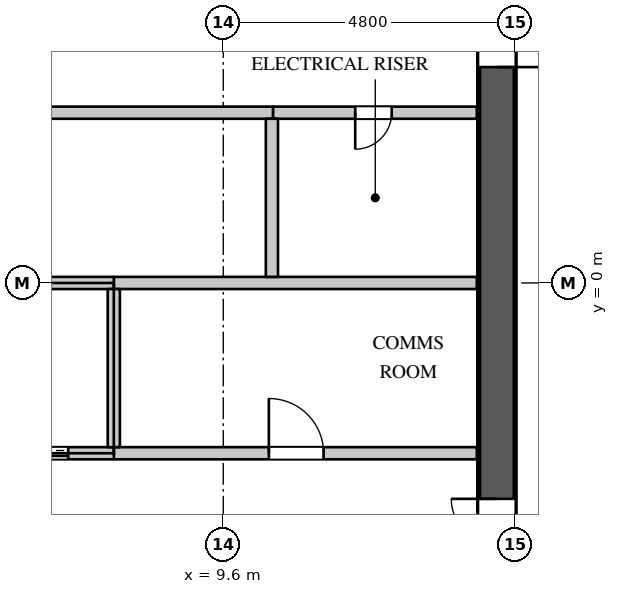
"""IFC4 building model, lengths in metres.
Left out: names, types, materials, properties, quantities, classifications, styles, units other than length and angle.
Written with IfcOpenShell. Run it as: python <this file> out.ifc"""

import sys

from ifc_helpers import new_model, si_unit, direction, frame, frame_2d, origin, place, context, subcontext, project, spatial, rectangle, extrude, element, fill, save


model = new_model("IFC4")
c1 = context("Model", 3, precision=1e-05, world=origin(), true_north=direction((0.0, 1.0)))
c2 = subcontext(c1, "Body", "Model", "MODEL_VIEW")
j1 = project(units=[si_unit("LENGTHUNIT", "METRE"), si_unit("PLANEANGLEUNIT", "RADIAN")], contexts=[c1])
p1 = place(None, origin())
s1 = spatial("IfcSite", under=j1, at=p1, CompositionType="ELEMENT")
p2 = place(p1, origin())
s2 = spatial("IfcBuilding", under=s1, at=p2, CompositionType="ELEMENT")
p3 = place(p2, frame((0.0, 0.0, 281.1)))
s3 = spatial("IfcBuildingStorey", under=s2, at=p3, CompositionType="ELEMENT", Elevation=281.1)
p4 = place(p3, frame((14.1, -11.4, 0.0), z_axis=(0.0, 0.0, 1.0), x_axis=(0.0, 1.0, 0.0)))
e1 = element("IfcWall", 1, at=p4, inside=s3, PredefinedType="SHEAR", context=c2, shape_type="SweptSolid", body=[
    extrude(rectangle(XDim=22.8, YDim=0.6, at=frame_2d((11.4, 0.0))), origin(), (0.0, 0.0, 1.0), 4.2),
])
p5 = place(p4, frame((20.45, 0.0, 0.0)))
e2 = element("IfcOpeningElement", 2, at=p5, cuts=e1, PredefinedType="OPENING", context=c2, shape_type="SweptSolid", body=[
    extrude(rectangle(XDim=1.1, YDim=2.2, at=frame_2d((0.55, 1.1))), frame((0.0, 0.31, 0.0), z_axis=(0.0, -1.0, 0.0), x_axis=(1.0, 0.0, 0.0)), (0.0, 0.0, 1.0), 0.62),
])
p6 = place(p4, frame((1.25, 0.0, 0.0)))
e3 = element("IfcOpeningElement", 3, at=p6, cuts=e1, PredefinedType="OPENING", context=c2, shape_type="SweptSolid", body=[
    extrude(rectangle(XDim=1.1, YDim=2.2, at=frame_2d((0.55, 1.1))), frame((0.0, 0.31, 0.0), z_axis=(0.0, -1.0, 0.0), x_axis=(1.0, 0.0, 0.0)), (0.0, 0.0, 1.0), 0.62),
])
p7 = place(p4, frame((14.95, 0.0, 0.0)))
e4 = element("IfcOpeningElement", 4, at=p7, cuts=e1, PredefinedType="OPENING", context=c2, shape_type="SweptSolid", body=[
    extrude(rectangle(XDim=1.5, YDim=2.4, at=frame_2d((0.75, 1.2))), frame((0.0, 0.31, 0.0), z_axis=(0.0, -1.0, 0.0), x_axis=(1.0, 0.0, 0.0)), (0.0, 0.0, 1.0), 0.62),
])
p8 = place(p4, frame((6.35, 0.0, 0.0)))
e5 = element("IfcOpeningElement", 5, at=p8, cuts=e1, PredefinedType="OPENING", context=c2, shape_type="SweptSolid", body=[
    extrude(rectangle(XDim=1.5, YDim=2.4, at=frame_2d((0.75, 1.2))), frame((0.0, 0.31, 0.0), z_axis=(0.0, -1.0, 0.0), x_axis=(1.0, 0.0, 0.0)), (0.0, 0.0, 1.0), 0.62),
])
p9 = place(p3, frame((-7.82, 2.8, 0.0), z_axis=(0.0, 0.0, 1.0), x_axis=(1.0, 0.0, 0.0)))
e6 = element("IfcWall", 6, at=p9, inside=s3, PredefinedType="PARTITIONING", context=c2, shape_type="SweptSolid", body=[
    extrude(rectangle(XDim=18.24, YDim=0.2, at=frame_2d((9.12, 0.0))), origin(), (0.0, 0.0, 1.0), 3.95),
])
p10 = place(p9, frame((3.75, 0.0, 0.0)))
e7 = element("IfcOpeningElement", 7, at=p10, cuts=e6, PredefinedType="OPENING", context=c2, shape_type="SweptSolid", body=[
    extrude(rectangle(XDim=0.9, YDim=2.2, at=frame_2d((0.45, 1.1))), frame((0.0, 0.11, 0.0), z_axis=(0.0, -1.0, 0.0), x_axis=(1.0, 0.0, 0.0)), (0.0, 0.0, 1.0), 0.22),
])
p11 = place(p9, frame((12.7, 0.0, 0.0)))
e8 = element("IfcOpeningElement", 8, at=p11, cuts=e6, PredefinedType="OPENING", context=c2, shape_type="SweptSolid", body=[
    extrude(rectangle(XDim=0.9, YDim=2.2, at=frame_2d((0.45, 1.1))), frame((0.0, 0.11, 0.0), z_axis=(0.0, -1.0, 0.0), x_axis=(1.0, 0.0, 0.0)), (0.0, 0.0, 1.0), 0.22),
])
p12 = place(p3, frame((7.8, -2.8, 0.0), z_axis=(0.0, 0.0, 1.0), x_axis=(1.0, 0.0, 0.0)))
e9 = element("IfcWall", 9, at=p12, inside=s3, PredefinedType="PARTITIONING", context=c2, shape_type="SweptSolid", body=[
    extrude(rectangle(XDim=5.97, YDim=0.2, at=frame_2d((2.985, 0.0))), origin(), (0.0, 0.0, 1.0), 3.95),
])
p13 = place(p12, frame((2.55, 0.0, 0.0)))
e10 = element("IfcOpeningElement", 10, at=p13, cuts=e9, PredefinedType="OPENING", context=c2, shape_type="SweptSolid", body=[
    extrude(rectangle(XDim=0.9, YDim=2.2, at=frame_2d((0.45, 1.1))), frame((0.0, 0.11, 0.0), z_axis=(0.0, -1.0, 0.0), x_axis=(1.0, 0.0, 0.0)), (0.0, 0.0, 1.0), 0.22),
])
p14 = place(p3, frame((7.8, 0.0, 0.0), z_axis=(0.0, 0.0, 1.0), x_axis=(1.0, 0.0, 0.0)))
e11 = element("IfcWall", 11, at=p14, inside=s3, PredefinedType="PARTITIONING", context=c2, shape_type="SweptSolid", body=[
    extrude(rectangle(XDim=5.97, YDim=0.2, at=frame_2d((2.985, 0.0))), origin(), (0.0, 0.0, 1.0), 3.95),
])
p15 = place(p3, frame((10.42, 2.8, 0.0), z_axis=(0.0, 0.0, 1.0), x_axis=(1.0, 0.0, 0.0)))
e12 = element("IfcWall", 12, at=p15, inside=s3, PredefinedType="PARTITIONING", context=c2, shape_type="SweptSolid", body=[
    extrude(rectangle(XDim=3.35, YDim=0.2, at=frame_2d((1.675, 0.0))), origin(), (0.0, 0.0, 1.0), 3.95),
])
p16 = place(p15, frame((1.35, 0.0, 0.0)))
e13 = element("IfcOpeningElement", 13, at=p16, cuts=e12, PredefinedType="OPENING", context=c2, shape_type="SweptSolid", body=[
    extrude(rectangle(XDim=0.6, YDim=2.0, at=frame_2d((0.3, 1.0))), frame((0.0, 0.11, 0.0), z_axis=(0.0, -1.0, 0.0), x_axis=(1.0, 0.0, 0.0)), (0.0, 0.0, 1.0), 0.22),
])
p17 = place(p3, frame((10.4, 0.1, 0.0), z_axis=(0.0, 0.0, 1.0), x_axis=(0.0, 1.0, 0.0)))
e14 = element("IfcWall", 14, at=p17, inside=s3, PredefinedType="PARTITIONING", context=c2, shape_type="SweptSolid", body=[
    extrude(rectangle(XDim=2.6, YDim=0.2, at=frame_2d((1.3, 0.0))), origin(), (0.0, 0.0, 1.0), 3.95),
])
p18 = place(p3, frame((-13.77, 0.0, 0.0), z_axis=(0.0, 0.0, 1.0), x_axis=(1.0, 0.0, 0.0)))
e15 = element("IfcWall", 15, at=p18, inside=s3, PredefinedType="PARTITIONING", context=c2, shape_type="SweptSolid", body=[
    extrude(rectangle(XDim=21.57, YDim=0.2, at=frame_2d((10.785, 0.0))), origin(), (0.0, 0.0, 1.0), 3.95),
])
p19 = place(p3, frame((-10.4, -2.8, 0.0), z_axis=(0.0, 0.0, 1.0), x_axis=(1.0, 0.0, 0.0)))
e16 = element("IfcWall", 16, at=p19, inside=s3, PredefinedType="PARTITIONING", context=c2, shape_type="SweptSolid", body=[
    extrude(rectangle(XDim=18.2, YDim=0.2, at=frame_2d((9.1, 0.0))), origin(), (0.0, 0.0, 1.0), 3.95),
])
p20 = place(p19, frame((0.75, 0.0, 0.0)))
e17 = element("IfcOpeningElement", 17, at=p20, cuts=e16, PredefinedType="OPENING", context=c2, shape_type="SweptSolid", body=[
    extrude(rectangle(XDim=1.1, YDim=2.2, at=frame_2d((0.55, 1.1))), frame((0.0, 0.11, 0.0), z_axis=(0.0, -1.0, 0.0), x_axis=(1.0, 0.0, 0.0)), (0.0, 0.0, 1.0), 0.22),
])
p21 = place(p19, frame((3.35, 0.0, 0.0)))
e18 = element("IfcOpeningElement", 18, at=p21, cuts=e16, PredefinedType="OPENING", context=c2, shape_type="SweptSolid", body=[
    extrude(rectangle(XDim=1.1, YDim=2.2, at=frame_2d((0.55, 1.1))), frame((0.0, 0.11, 0.0), z_axis=(0.0, -1.0, 0.0), x_axis=(1.0, 0.0, 0.0)), (0.0, 0.0, 1.0), 0.22),
])
p22 = place(p19, frame((5.95, 0.0, 0.0)))
e19 = element("IfcOpeningElement", 19, at=p22, cuts=e16, PredefinedType="OPENING", context=c2, shape_type="SweptSolid", body=[
    extrude(rectangle(XDim=1.1, YDim=2.2, at=frame_2d((0.55, 1.1))), frame((0.0, 0.11, 0.0), z_axis=(0.0, -1.0, 0.0), x_axis=(1.0, 0.0, 0.0)), (0.0, 0.0, 1.0), 0.22),
])
p23 = place(p19, frame((8.55, 0.0, 0.0)))
e20 = element("IfcOpeningElement", 20, at=p23, cuts=e16, PredefinedType="OPENING", context=c2, shape_type="SweptSolid", body=[
    extrude(rectangle(XDim=1.1, YDim=2.2, at=frame_2d((0.55, 1.1))), frame((0.0, 0.11, 0.0), z_axis=(0.0, -1.0, 0.0), x_axis=(1.0, 0.0, 0.0)), (0.0, 0.0, 1.0), 0.22),
])
p24 = place(p19, frame((11.15, 0.0, 0.0)))
e21 = element("IfcOpeningElement", 21, at=p24, cuts=e16, PredefinedType="OPENING", context=c2, shape_type="SweptSolid", body=[
    extrude(rectangle(XDim=1.1, YDim=2.2, at=frame_2d((0.55, 1.1))), frame((0.0, 0.11, 0.0), z_axis=(0.0, -1.0, 0.0), x_axis=(1.0, 0.0, 0.0)), (0.0, 0.0, 1.0), 0.22),
])
p25 = place(p19, frame((13.75, 0.0, 0.0)))
e22 = element("IfcOpeningElement", 22, at=p25, cuts=e16, PredefinedType="OPENING", context=c2, shape_type="SweptSolid", body=[
    extrude(rectangle(XDim=1.1, YDim=2.2, at=frame_2d((0.55, 1.1))), frame((0.0, 0.11, 0.0), z_axis=(0.0, -1.0, 0.0), x_axis=(1.0, 0.0, 0.0)), (0.0, 0.0, 1.0), 0.22),
])
p26 = place(p19, frame((16.35, 0.0, 0.0)))
e23 = element("IfcOpeningElement", 23, at=p26, cuts=e16, PredefinedType="OPENING", context=c2, shape_type="SweptSolid", body=[
    extrude(rectangle(XDim=1.1, YDim=2.2, at=frame_2d((0.55, 1.1))), frame((0.0, 0.11, 0.0), z_axis=(0.0, -1.0, 0.0), x_axis=(1.0, 0.0, 0.0)), (0.0, 0.0, 1.0), 0.22),
])
p27 = place(p3, frame((7.8, -2.7, 0.0), z_axis=(0.0, 0.0, 1.0), x_axis=(0.0, 1.0, 0.0)))
e24 = element("IfcWall", 24, at=p27, inside=s3, PredefinedType="PARTITIONING", context=c2, shape_type="SweptSolid", body=[
    extrude(rectangle(XDim=2.6, YDim=0.2, at=frame_2d((1.3, 0.0))), origin(), (0.0, 0.0, 1.0), 3.95),
])
p28 = place(p16, origin())
e25 = element("IfcDoor", 25, at=p28, inside=s3, OperationType="SINGLE_SWING_RIGHT", PredefinedType="DOOR", context=c2, shape_type="SweptSolid", body=[
    extrude(rectangle(XDim=0.6, YDim=2.0, at=frame_2d((0.3, 1.0))), frame((0.0, 0.025, 0.0), z_axis=(0.0, -1.0, 0.0), x_axis=(1.0, 0.0, 0.0)), (0.0, 0.0, 1.0), 0.05),
])
fill(e13, e25)
p29 = place(p13, origin())
e26 = element("IfcDoor", 26, at=p29, inside=s3, OperationType="SINGLE_SWING_LEFT", PredefinedType="DOOR", context=c2, shape_type="SweptSolid", body=[
    extrude(rectangle(XDim=0.9, YDim=2.2, at=frame_2d((0.45, 1.1))), frame((0.0, 0.025, 0.0), z_axis=(0.0, -1.0, 0.0), x_axis=(1.0, 0.0, 0.0)), (0.0, 0.0, 1.0), 0.05),
])
fill(e10, e26)
p30 = place(p26, origin())
e27 = element("IfcDoor", 27, at=p30, inside=s3, OperationType="DOUBLE_DOOR_SLIDING", PredefinedType="DOOR", context=c2, shape_type="SweptSolid", body=[
    extrude(rectangle(XDim=1.1, YDim=2.2, at=frame_2d((0.55, 1.1))), frame((0.0, 0.025, 0.0), z_axis=(0.0, -1.0, 0.0), x_axis=(1.0, 0.0, 0.0)), (0.0, 0.0, 1.0), 0.05),
])
fill(e23, e27)
p31 = place(p7, origin())
e28 = element("IfcDoor", 28, at=p31, inside=s3, OperationType="DOUBLE_DOOR_SINGLE_SWING", PredefinedType="DOOR", context=c2, shape_type="SweptSolid", body=[
    extrude(rectangle(XDim=1.5, YDim=2.4, at=frame_2d((0.75, 1.2))), frame((0.0, -0.245, 0.0), z_axis=(0.0, -1.0, 0.0), x_axis=(1.0, 0.0, 0.0)), (0.0, 0.0, 1.0), 0.05),
])
fill(e4, e28)
p32 = place(p8, origin())
e29 = element("IfcDoor", 29, at=p32, inside=s3, OperationType="DOUBLE_DOOR_SINGLE_SWING", PredefinedType="DOOR", context=c2, shape_type="SweptSolid", body=[
    extrude(rectangle(XDim=1.5, YDim=2.4, at=frame_2d((0.75, 1.2))), frame((0.0, 0.295, 0.0), z_axis=(0.0, -1.0, 0.0), x_axis=(1.0, 0.0, 0.0)), (0.0, 0.0, 1.0), 0.05),
])
fill(e5, e29)
save(model, sys.argv[1])
